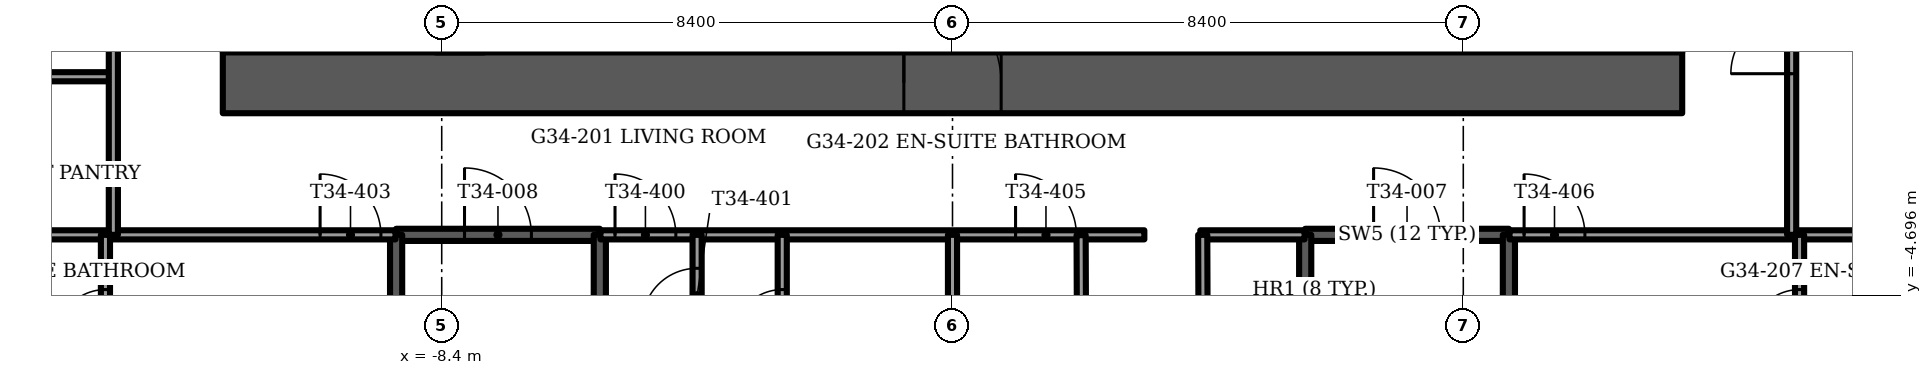
"""IFC4 building model, lengths in metres.
Left out: names, types, materials, properties, quantities, classifications, styles, units other than length and angle.
Written with IfcOpenShell. Run it as: python <this file> out.ifc"""

import sys

from ifc_helpers import new_model, si_unit, direction, frame, frame_2d, origin, place, context, subcontext, project, spatial, rectangle, extrude, element, fill, save


model = new_model("IFC4")
c1 = context("Model", 3, precision=1e-05, world=origin(), true_north=direction((0.0, 1.0)))
c2 = subcontext(c1, "Body", "Model", "MODEL_VIEW")
j1 = project(units=[si_unit("LENGTHUNIT", "METRE"), si_unit("PLANEANGLEUNIT", "RADIAN")], contexts=[c1])
p1 = place(None, origin())
s1 = spatial("IfcSite", under=j1, at=p1, CompositionType="ELEMENT")
p2 = place(p1, origin())
s2 = spatial("IfcBuilding", under=s1, at=p2, CompositionType="ELEMENT")
p3 = place(p2, frame((0.0, 0.0, 138.5)))
s3 = spatial("IfcBuildingStorey", under=s2, at=p3, CompositionType="ELEMENT", Elevation=138.5)
p4 = place(p3, frame((-12.0, -1.2, -0.3), z_axis=(0.0, 0.0, 1.0), x_axis=(1.0, 0.0, 0.0)))
e1 = element("IfcWall", 1, at=p4, inside=s3, PredefinedType="SHEAR", context=c2, shape_type="SweptSolid", body=[
    extrude(rectangle(XDim=24.0, YDim=1.0, at=frame_2d((12.0, 0.0))), origin(), (0.0, 0.0, 1.0), 3.75),
])
p5 = place(p4, frame((11.2, 0.0, 0.0)))
e2 = element("IfcOpeningElement", 2, at=p5, cuts=e1, PredefinedType="OPENING", context=c2, shape_type="SweptSolid", body=[
    extrude(rectangle(XDim=1.6, YDim=2.1, at=frame_2d((0.8, 1.05))), frame((0.0, 0.5, 0.0), z_axis=(0.0, -1.0, 0.0), x_axis=(1.0, 0.0, 0.0)), (0.0, 0.0, 1.0), 1.0),
])
p6 = place(p3, frame((-18.568, -1.689, 0.0), z_axis=(0.0, 0.0, 1.0), x_axis=(0.499994317138, -0.866028684761, 0.0)))
e3 = element("IfcWall", 3, at=p6, inside=s3, PredefinedType="SOLIDWALL", context=c2, shape_type="SweptSolid", body=[
    extrude(rectangle(XDim=10.468, YDim=0.15, at=frame_2d((5.234, 0.0))), origin(), (0.0, 0.0, 1.0), 3.45),
])
p7 = place(p6, frame((3.448, 0.0, 0.15)))
e4 = element("IfcOpeningElement", 4, at=p7, cuts=e3, PredefinedType="OPENING", context=c2, shape_type="SweptSolid", body=[
    extrude(rectangle(XDim=1.5, YDim=2.2, at=frame_2d((0.75, 1.1))), frame((0.0, 0.075, 0.0), z_axis=(0.0, -1.0, 0.0), x_axis=(1.0, 0.0, 0.0)), (0.0, 0.0, 1.0), 0.15),
])
p8 = place(p6, frame((6.021, 0.0, 0.15)))
e5 = element("IfcOpeningElement", 5, at=p8, cuts=e3, PredefinedType="OPENING", context=c2, shape_type="SweptSolid", body=[
    extrude(rectangle(XDim=1.7, YDim=2.2, at=frame_2d((0.85, 1.1))), frame((0.0, 0.075, 0.0), z_axis=(0.0, -1.0, 0.0), x_axis=(1.0, 0.0, 0.0)), (0.0, 0.0, 1.0), 0.15),
])
p9 = place(p3, frame((13.334, -10.755, 0.0), z_axis=(0.0, 0.0, 1.0), x_axis=(0.499994317138, 0.866028684761, 0.0)))
e6 = element("IfcWall", 6, at=p9, inside=s3, PredefinedType="SOLIDWALL", context=c2, shape_type="SweptSolid", body=[
    extrude(rectangle(XDim=10.468, YDim=0.15, at=frame_2d((5.234, 0.0))), origin(), (0.0, 0.0, 1.0), 3.45),
])
p10 = place(p9, frame((0.847, 0.0, 0.15)))
e7 = element("IfcOpeningElement", 7, at=p10, cuts=e6, PredefinedType="OPENING", context=c2, shape_type="SweptSolid", body=[
    extrude(rectangle(XDim=1.7, YDim=2.2, at=frame_2d((0.85, 1.1))), frame((0.0, 0.075, 0.0), z_axis=(0.0, -1.0, 0.0), x_axis=(1.0, 0.0, 0.0)), (0.0, 0.0, 1.0), 0.15),
])
p11 = place(p9, frame((6.322, 0.0, 0.15)))
e8 = element("IfcOpeningElement", 8, at=p11, cuts=e6, PredefinedType="OPENING", context=c2, shape_type="SweptSolid", body=[
    extrude(rectangle(XDim=1.5, YDim=2.2, at=frame_2d((0.75, 1.1))), frame((0.0, 0.075, 0.0), z_axis=(0.0, -1.0, 0.0), x_axis=(1.0, 0.0, 0.0)), (0.0, 0.0, 1.0), 0.15),
])
p12 = place(p3, frame((5.8, -3.7, -0.3), z_axis=(0.0, 0.0, 1.0), x_axis=(1.0, 0.0, 0.0)))
e9 = element("IfcWall", 9, at=p12, inside=s3, PredefinedType="SOLIDWALL", context=c2, shape_type="SweptSolid", body=[
    extrude(rectangle(XDim=3.35, YDim=0.2, at=frame_2d((1.675, 0.0))), origin(), (0.0, 0.0, 1.0), 3.75),
])
p13 = place(p12, frame((1.125, 0.0, 0.0)))
e10 = element("IfcOpeningElement", 10, at=p13, cuts=e9, PredefinedType="OPENING", context=c2, shape_type="SweptSolid", body=[
    extrude(rectangle(XDim=1.1, YDim=2.1, at=frame_2d((0.55, 1.05))), frame((0.0, 0.1, 0.0), z_axis=(0.0, -1.0, 0.0), x_axis=(1.0, 0.0, 0.0)), (0.0, 0.0, 1.0), 0.2),
])
for number, where, z_axis, x_axis in (
    (11, (5.8, -3.7, -0.3), (0.0, 0.0, 1.0), (0.0, -1.0, 0.0)),
    (12, (9.15, -3.7, -0.3), (0.0, 0.0, 1.0), (0.0, -1.0, 0.0)),
):
    element("IfcWall", number, at=place(p3, frame(where, z_axis=z_axis, x_axis=x_axis)), inside=s3, PredefinedType="SOLIDWALL", context=c2, shape_type="SweptSolid", body=[
        extrude(rectangle(XDim=7.7, YDim=0.2, at=frame_2d((3.85, 0.0))), origin(), (0.0, 0.0, 1.0), 3.75),
    ])
p14 = place(p3, frame((-9.15, -3.7, -0.3), z_axis=(0.0, 0.0, 1.0), x_axis=(1.0, 0.0, 0.0)))
e13 = element("IfcWall", 13, at=p14, inside=s3, PredefinedType="SOLIDWALL", context=c2, shape_type="SweptSolid", body=[
    extrude(rectangle(XDim=3.35, YDim=0.2, at=frame_2d((1.675, 0.0))), origin(), (0.0, 0.0, 1.0), 3.75),
])
p15 = place(p14, frame((1.125, 0.0, 0.0)))
e14 = element("IfcOpeningElement", 14, at=p15, cuts=e13, PredefinedType="OPENING", context=c2, shape_type="SweptSolid", body=[
    extrude(rectangle(XDim=1.1, YDim=2.1, at=frame_2d((0.55, 1.05))), frame((0.0, 0.1, 0.0), z_axis=(0.0, -1.0, 0.0), x_axis=(1.0, 0.0, 0.0)), (0.0, 0.0, 1.0), 0.2),
])
for number, where, z_axis, x_axis in (
    (15, (-9.15, -3.7, -0.3), (0.0, 0.0, 1.0), (0.0, -1.0, 0.0)),
    (16, (-5.8, -3.7, -0.3), (0.0, 0.0, 1.0), (0.0, -1.0, 0.0)),
):
    element("IfcWall", number, at=place(p3, frame(where, z_axis=z_axis, x_axis=x_axis)), inside=s3, PredefinedType="SOLIDWALL", context=c2, shape_type="SweptSolid", body=[
        extrude(rectangle(XDim=7.7, YDim=0.2, at=frame_2d((3.85, 0.0))), origin(), (0.0, 0.0, 1.0), 3.75),
    ])
p16 = place(p3, frame((-17.459, -3.7, 0.0), z_axis=(0.0, 0.0, 1.0), x_axis=(1.0, 0.0, 0.0)))
e17 = element("IfcWall", 17, at=p16, inside=s3, PredefinedType="PARTITIONING", context=c2, shape_type="SweptSolid", body=[
    extrude(rectangle(XDim=8.299, YDim=0.15, at=frame_2d((4.149, 0.0))), origin(), (0.0, 0.0, 1.0), 3.45),
])
p17 = place(p16, frame((7.059, 0.0, 0.0)))
e18 = element("IfcOpeningElement", 18, at=p17, cuts=e17, PredefinedType="OPENING", context=c2, shape_type="SweptSolid", body=[
    extrude(rectangle(XDim=1.0, YDim=2.1, at=frame_2d((0.5, 1.05))), frame((0.0, 0.075, 0.0), z_axis=(0.0, -1.0, 0.0), x_axis=(1.0, 0.0, 0.0)), (0.0, 0.0, 1.0), 0.15),
])
p18 = place(p3, frame((-5.79, -3.7, 0.0), z_axis=(0.0, 0.0, 1.0), x_axis=(1.0, 0.0, 0.0)))
e19 = element("IfcWall", 19, at=p18, inside=s3, PredefinedType="PARTITIONING", context=c2, shape_type="SweptSolid", body=[
    extrude(rectangle(XDim=8.945, YDim=0.15, at=frame_2d((4.473, 0.0))), origin(), (0.0, 0.0, 1.0), 3.45),
])
p19 = place(p18, frame((0.24, 0.0, 0.0)))
e20 = element("IfcOpeningElement", 20, at=p19, cuts=e19, PredefinedType="OPENING", context=c2, shape_type="SweptSolid", body=[
    extrude(rectangle(XDim=1.0, YDim=2.1, at=frame_2d((0.5, 1.05))), frame((0.0, 0.075, 0.0), z_axis=(0.0, -1.0, 0.0), x_axis=(1.0, 0.0, 0.0)), (0.0, 0.0, 1.0), 0.15),
])
p20 = place(p18, frame((6.827, 0.0, 0.0)))
e21 = element("IfcOpeningElement", 21, at=p20, cuts=e19, PredefinedType="OPENING", context=c2, shape_type="SweptSolid", body=[
    extrude(rectangle(XDim=1.0, YDim=2.1, at=frame_2d((0.5, 1.05))), frame((0.0, 0.075, 0.0), z_axis=(0.0, -1.0, 0.0), x_axis=(1.0, 0.0, 0.0)), (0.0, 0.0, 1.0), 0.15),
])
p21 = place(p3, frame((4.075, -3.7, 0.0), z_axis=(0.0, 0.0, 1.0), x_axis=(1.0, 0.0, 0.0)))
e22 = element("IfcWall", 22, at=p21, inside=s3, PredefinedType="PARTITIONING", context=c2, shape_type="SweptSolid", body=[
    extrude(rectangle(XDim=1.715, YDim=0.15, at=frame_2d((0.857, 0.0))), origin(), (0.0, 0.0, 1.0), 3.45),
])
p22 = place(p3, frame((9.16, -3.7, 0.0), z_axis=(0.0, 0.0, 1.0), x_axis=(1.0, 0.0, 0.0)))
e23 = element("IfcWall", 23, at=p22, inside=s3, PredefinedType="PARTITIONING", context=c2, shape_type="SweptSolid", body=[
    extrude(rectangle(XDim=8.299, YDim=0.15, at=frame_2d((4.149, 0.0))), origin(), (0.0, 0.0, 1.0), 3.45),
])
p23 = place(p22, frame((0.24, 0.0, 0.0)))
e24 = element("IfcOpeningElement", 24, at=p23, cuts=e23, PredefinedType="OPENING", context=c2, shape_type="SweptSolid", body=[
    extrude(rectangle(XDim=1.0, YDim=2.1, at=frame_2d((0.5, 1.05))), frame((0.0, 0.075, 0.0), z_axis=(0.0, -1.0, 0.0), x_axis=(1.0, 0.0, 0.0)), (0.0, 0.0, 1.0), 0.15),
])
p24 = place(p3, frame((-17.0, -1.1, 0.0), z_axis=(0.0, 0.0, 1.0), x_axis=(1.0, 0.0, 0.0)))
e25 = element("IfcWall", 25, at=p24, inside=s3, PredefinedType="PARTITIONING", context=c2, shape_type="SweptSolid", body=[
    extrude(rectangle(XDim=3.2, YDim=0.15, at=frame_2d((1.6, 0.0))), origin(), (0.0, 0.0, 1.0), 3.45),
])
p25 = place(p24, frame((1.15, 0.0, 0.0)))
e26 = element("IfcOpeningElement", 26, at=p25, cuts=e25, PredefinedType="OPENING", context=c2, shape_type="SweptSolid", body=[
    extrude(rectangle(XDim=0.9, YDim=2.1, at=frame_2d((0.45, 1.05))), frame((0.0, 0.075, 0.0), z_axis=(0.0, -1.0, 0.0), x_axis=(1.0, 0.0, 0.0)), (0.0, 0.0, 1.0), 0.15),
])
p26 = place(p3, frame((13.93, -6.3, 0.0), z_axis=(0.0, 0.0, 1.0), x_axis=(0.0, 1.0, 0.0)))
e27 = element("IfcWall", 27, at=p26, inside=s3, PredefinedType="PARTITIONING", context=c2, shape_type="SweptSolid", body=[
    extrude(rectangle(XDim=2.6, YDim=0.15, at=frame_2d((1.3, 0.0))), origin(), (0.0, 0.0, 1.0), 3.45),
])
p27 = place(p26, frame((0.9, 0.0, 0.0)))
e28 = element("IfcOpeningElement", 28, at=p27, cuts=e27, PredefinedType="OPENING", context=c2, shape_type="SweptSolid", body=[
    extrude(rectangle(XDim=0.8, YDim=2.1, at=frame_2d((0.4, 1.05))), frame((0.0, 0.075, 0.0), z_axis=(0.0, -1.0, 0.0), x_axis=(1.0, 0.0, 0.0)), (0.0, 0.0, 1.0), 0.15),
])
p28 = place(p3, frame((13.8, -3.7, 0.0), z_axis=(0.0, 0.0, 1.0), x_axis=(0.0, 1.0, 0.0)))
e29 = element("IfcWall", 29, at=p28, inside=s3, PredefinedType="PARTITIONING", context=c2, shape_type="SweptSolid", body=[
    extrude(rectangle(XDim=11.425, YDim=0.15, at=frame_2d((5.712, 0.0))), origin(), (0.0, 0.0, 1.0), 3.45),
])
p29 = place(p28, frame((2.65, 0.0, 0.0)))
e30 = element("IfcOpeningElement", 30, at=p29, cuts=e29, PredefinedType="OPENING", context=c2, shape_type="SweptSolid", body=[
    extrude(rectangle(XDim=1.0, YDim=2.1, at=frame_2d((0.5, 1.05))), frame((0.0, 0.075, 0.0), z_axis=(0.0, -1.0, 0.0), x_axis=(1.0, 0.0, 0.0)), (0.0, 0.0, 1.0), 0.15),
])
p30 = place(p28, frame((8.24, 0.0, 0.0)))
e31 = element("IfcOpeningElement", 31, at=p30, cuts=e29, PredefinedType="OPENING", context=c2, shape_type="SweptSolid", body=[
    extrude(rectangle(XDim=1.0, YDim=2.1, at=frame_2d((0.5, 1.05))), frame((0.0, 0.075, 0.0), z_axis=(0.0, -1.0, 0.0), x_axis=(1.0, 0.0, 0.0)), (0.0, 0.0, 1.0), 0.15),
])
p31 = place(p3, frame((0.0, -9.01, 0.0), z_axis=(0.0, 0.0, 1.0), x_axis=(0.0, 1.0, 0.0)))
e32 = element("IfcWall", 32, at=p31, inside=s3, PredefinedType="PARTITIONING", context=c2, shape_type="SweptSolid", body=[
    extrude(rectangle(XDim=5.31, YDim=0.15, at=frame_2d((2.655, 0.0))), origin(), (0.0, 0.0, 1.0), 3.45),
])
p32 = place(p3, frame((-2.8, -6.3, 0.0), z_axis=(0.0, 0.0, 1.0), x_axis=(0.0, 1.0, 0.0)))
e33 = element("IfcWall", 33, at=p32, inside=s3, PredefinedType="PARTITIONING", context=c2, shape_type="SweptSolid", body=[
    extrude(rectangle(XDim=2.6, YDim=0.15, at=frame_2d((1.3, 0.0))), origin(), (0.0, 0.0, 1.0), 3.45),
])
p33 = place(p32, frame((0.9, 0.0, 0.0)))
e34 = element("IfcOpeningElement", 34, at=p33, cuts=e33, PredefinedType="OPENING", context=c2, shape_type="SweptSolid", body=[
    extrude(rectangle(XDim=0.8, YDim=2.1, at=frame_2d((0.4, 1.05))), frame((0.0, 0.075, 0.0), z_axis=(0.0, -1.0, 0.0), x_axis=(1.0, 0.0, 0.0)), (0.0, 0.0, 1.0), 0.15),
])
p34 = place(p3, frame((-4.2, -9.01, 0.0), z_axis=(0.0, 0.0, 1.0), x_axis=(0.0, 1.0, 0.0)))
e35 = element("IfcWall", 35, at=p34, inside=s3, PredefinedType="PARTITIONING", context=c2, shape_type="SweptSolid", body=[
    extrude(rectangle(XDim=5.31, YDim=0.15, at=frame_2d((2.655, 0.0))), origin(), (0.0, 0.0, 1.0), 3.45),
])
p35 = place(p34, frame((3.86, 0.0, 0.0)))
e36 = element("IfcOpeningElement", 36, at=p35, cuts=e35, PredefinedType="OPENING", context=c2, shape_type="SweptSolid", body=[
    extrude(rectangle(XDim=0.9, YDim=2.1, at=frame_2d((0.45, 1.05))), frame((0.0, 0.075, 0.0), z_axis=(0.0, -1.0, 0.0), x_axis=(1.0, 0.0, 0.0)), (0.0, 0.0, 1.0), 0.15),
])
p36 = place(p3, frame((-13.8, -3.7, 0.0), z_axis=(0.0, 0.0, 1.0), x_axis=(0.0, 1.0, 0.0)))
e37 = element("IfcWall", 37, at=p36, inside=s3, PredefinedType="PARTITIONING", context=c2, shape_type="SweptSolid", body=[
    extrude(rectangle(XDim=11.425, YDim=0.15, at=frame_2d((5.712, 0.0))), origin(), (0.0, 0.0, 1.0), 3.45),
])
p37 = place(p36, frame((3.595, 0.0, 0.0)))
e38 = element("IfcOpeningElement", 38, at=p37, cuts=e37, PredefinedType="OPENING", context=c2, shape_type="SweptSolid", body=[
    extrude(rectangle(XDim=1.0, YDim=2.1, at=frame_2d((0.5, 1.05))), frame((0.0, 0.075, 0.0), z_axis=(0.0, -1.0, 0.0), x_axis=(1.0, 0.0, 0.0)), (0.0, 0.0, 1.0), 0.15),
])
p38 = place(p36, frame((8.24, 0.0, 0.0)))
e39 = element("IfcOpeningElement", 39, at=p38, cuts=e37, PredefinedType="OPENING", context=c2, shape_type="SweptSolid", body=[
    extrude(rectangle(XDim=1.0, YDim=2.1, at=frame_2d((0.5, 1.05))), frame((0.0, 0.075, 0.0), z_axis=(0.0, -1.0, 0.0), x_axis=(1.0, 0.0, 0.0)), (0.0, 0.0, 1.0), 0.15),
])
p39 = place(p3, frame((-13.93, -6.3, 0.0), z_axis=(0.0, 0.0, 1.0), x_axis=(0.0, 1.0, 0.0)))
e40 = element("IfcWall", 40, at=p39, inside=s3, PredefinedType="PARTITIONING", context=c2, shape_type="SweptSolid", body=[
    extrude(rectangle(XDim=2.6, YDim=0.15, at=frame_2d((1.3, 0.0))), origin(), (0.0, 0.0, 1.0), 3.45),
])
p40 = place(p39, frame((0.9, 0.0, 0.0)))
e41 = element("IfcOpeningElement", 41, at=p40, cuts=e40, PredefinedType="OPENING", context=c2, shape_type="SweptSolid", body=[
    extrude(rectangle(XDim=0.8, YDim=2.1, at=frame_2d((0.4, 1.05))), frame((0.0, 0.075, 0.0), z_axis=(0.0, -1.0, 0.0), x_axis=(1.0, 0.0, 0.0)), (0.0, 0.0, 1.0), 0.15),
])
p41 = place(p3, frame((4.134, -8.87, 0.0), z_axis=(0.0, 0.0, 1.0), x_axis=(-0.003683216269, 0.999993216936, 0.0)))
e42 = element("IfcWall", 42, at=p41, inside=s3, PredefinedType="PARTITIONING", context=c2, shape_type="SweptSolid", body=[
    extrude(rectangle(XDim=5.17, YDim=0.15, at=frame_2d((2.585, 0.0))), origin(), (0.0, 0.0, 1.0), 3.45),
])
p42 = place(p3, frame((2.134, -8.87, 0.0), z_axis=(0.0, 0.0, 1.0), x_axis=(-0.003686872276, 0.999993203463, 0.0)))
e43 = element("IfcWall", 43, at=p42, inside=s3, PredefinedType="PARTITIONING", context=c2, shape_type="SweptSolid", body=[
    extrude(rectangle(XDim=5.165, YDim=0.15, at=frame_2d((2.583, 0.0))), origin(), (0.0, 0.0, 1.0), 3.45),
])
p43 = place(p5, origin())
e44 = element("IfcDoor", 44, at=p43, inside=s3, OperationType="DOUBLE_DOOR_SINGLE_SWING", PredefinedType="DOOR", context=c2, shape_type="SweptSolid", body=[
    extrude(rectangle(XDim=1.6, YDim=2.1, at=frame_2d((0.8, 1.05))), frame((0.0, 0.025, 0.0), z_axis=(0.0, -1.0, 0.0), x_axis=(1.0, 0.0, 0.0)), (0.0, 0.0, 1.0), 0.05),
])
fill(e2, e44)
p44 = place(p13, origin())
e45 = element("IfcDoor", 45, at=p44, inside=s3, OperationType="SINGLE_SWING_LEFT", PredefinedType="DOOR", context=c2, shape_type="SweptSolid", body=[
    extrude(rectangle(XDim=1.1, YDim=2.1, at=frame_2d((0.55, 1.05))), frame((0.0, 0.025, 0.0), z_axis=(0.0, -1.0, 0.0), x_axis=(1.0, 0.0, 0.0)), (0.0, 0.0, 1.0), 0.05),
])
fill(e10, e45)
p45 = place(p15, origin())
e46 = element("IfcDoor", 46, at=p45, inside=s3, OperationType="SINGLE_SWING_LEFT", PredefinedType="DOOR", context=c2, shape_type="SweptSolid", body=[
    extrude(rectangle(XDim=1.1, YDim=2.1, at=frame_2d((0.55, 1.05))), frame((0.0, 0.025, 0.0), z_axis=(0.0, -1.0, 0.0), x_axis=(1.0, 0.0, 0.0)), (0.0, 0.0, 1.0), 0.05),
])
fill(e14, e46)
p46 = place(p19, origin())
e47 = element("IfcDoor", 47, at=p46, inside=s3, OperationType="SINGLE_SWING_LEFT", PredefinedType="DOOR", context=c2, shape_type="SweptSolid", body=[
    extrude(rectangle(XDim=1.0, YDim=2.1, at=frame_2d((0.5, 1.05))), frame((0.0, 0.025, 0.0), z_axis=(0.0, -1.0, 0.0), x_axis=(1.0, 0.0, 0.0)), (0.0, 0.0, 1.0), 0.05),
])
fill(e20, e47)
p47 = place(p35, origin())
e48 = element("IfcDoor", 48, at=p47, inside=s3, OperationType="SINGLE_SWING_RIGHT", PredefinedType="DOOR", context=c2, shape_type="SweptSolid", body=[
    extrude(rectangle(XDim=0.9, YDim=2.1, at=frame_2d((0.45, 1.05))), frame((0.0, 0.025, 0.0), z_axis=(0.0, -1.0, 0.0), x_axis=(1.0, 0.0, 0.0)), (0.0, 0.0, 1.0), 0.05),
])
fill(e36, e48)
p48 = place(p33, origin())
e49 = element("IfcDoor", 49, at=p48, inside=s3, OperationType="SINGLE_SWING_RIGHT", PredefinedType="DOOR", context=c2, shape_type="SweptSolid", body=[
    extrude(rectangle(XDim=0.8, YDim=2.1, at=frame_2d((0.4, 1.05))), frame((0.0, 0.025, 0.0), z_axis=(0.0, -1.0, 0.0), x_axis=(1.0, 0.0, 0.0)), (0.0, 0.0, 1.0), 0.05),
])
fill(e34, e49)
p49 = place(p17, origin())
e50 = element("IfcDoor", 50, at=p49, inside=s3, OperationType="SINGLE_SWING_RIGHT", PredefinedType="DOOR", context=c2, shape_type="SweptSolid", body=[
    extrude(rectangle(XDim=1.0, YDim=2.1, at=frame_2d((0.5, 1.05))), frame((0.0, 0.025, 0.0), z_axis=(0.0, -1.0, 0.0), x_axis=(1.0, 0.0, 0.0)), (0.0, 0.0, 1.0), 0.05),
])
fill(e18, e50)
p50 = place(p40, origin())
e51 = element("IfcDoor", 51, at=p50, inside=s3, OperationType="SINGLE_SWING_RIGHT", PredefinedType="DOOR", context=c2, shape_type="SweptSolid", body=[
    extrude(rectangle(XDim=0.8, YDim=2.1, at=frame_2d((0.4, 1.05))), frame((0.0, 0.025, 0.0), z_axis=(0.0, -1.0, 0.0), x_axis=(1.0, 0.0, 0.0)), (0.0, 0.0, 1.0), 0.05),
])
fill(e41, e51)
p51 = place(p20, origin())
e52 = element("IfcDoor", 52, at=p51, inside=s3, OperationType="SINGLE_SWING_LEFT", PredefinedType="DOOR", context=c2, shape_type="SweptSolid", body=[
    extrude(rectangle(XDim=1.0, YDim=2.1, at=frame_2d((0.5, 1.05))), frame((0.0, 0.025, 0.0), z_axis=(0.0, -1.0, 0.0), x_axis=(1.0, 0.0, 0.0)), (0.0, 0.0, 1.0), 0.05),
])
fill(e21, e52)
p52 = place(p23, origin())
e53 = element("IfcDoor", 53, at=p52, inside=s3, OperationType="SINGLE_SWING_LEFT", PredefinedType="DOOR", context=c2, shape_type="SweptSolid", body=[
    extrude(rectangle(XDim=1.0, YDim=2.1, at=frame_2d((0.5, 1.05))), frame((0.0, 0.025, 0.0), z_axis=(0.0, -1.0, 0.0), x_axis=(1.0, 0.0, 0.0)), (0.0, 0.0, 1.0), 0.05),
])
fill(e24, e53)
p53 = place(p27, origin())
e54 = element("IfcDoor", 54, at=p53, inside=s3, OperationType="SINGLE_SWING_RIGHT", PredefinedType="DOOR", context=c2, shape_type="SweptSolid", body=[
    extrude(rectangle(XDim=0.8, YDim=2.1, at=frame_2d((0.4, 1.05))), frame((0.0, 0.025, 0.0), z_axis=(0.0, -1.0, 0.0), x_axis=(1.0, 0.0, 0.0)), (0.0, 0.0, 1.0), 0.05),
])
fill(e28, e54)
p54 = place(p29, origin())
e55 = element("IfcDoor", 55, at=p54, inside=s3, OperationType="SINGLE_SWING_RIGHT", PredefinedType="DOOR", context=c2, shape_type="SweptSolid", body=[
    extrude(rectangle(XDim=1.0, YDim=2.1, at=frame_2d((0.5, 1.05))), frame((0.0, 0.025, 0.0), z_axis=(0.0, -1.0, 0.0), x_axis=(1.0, 0.0, 0.0)), (0.0, 0.0, 1.0), 0.05),
])
fill(e30, e55)
save(model, sys.argv[1])
